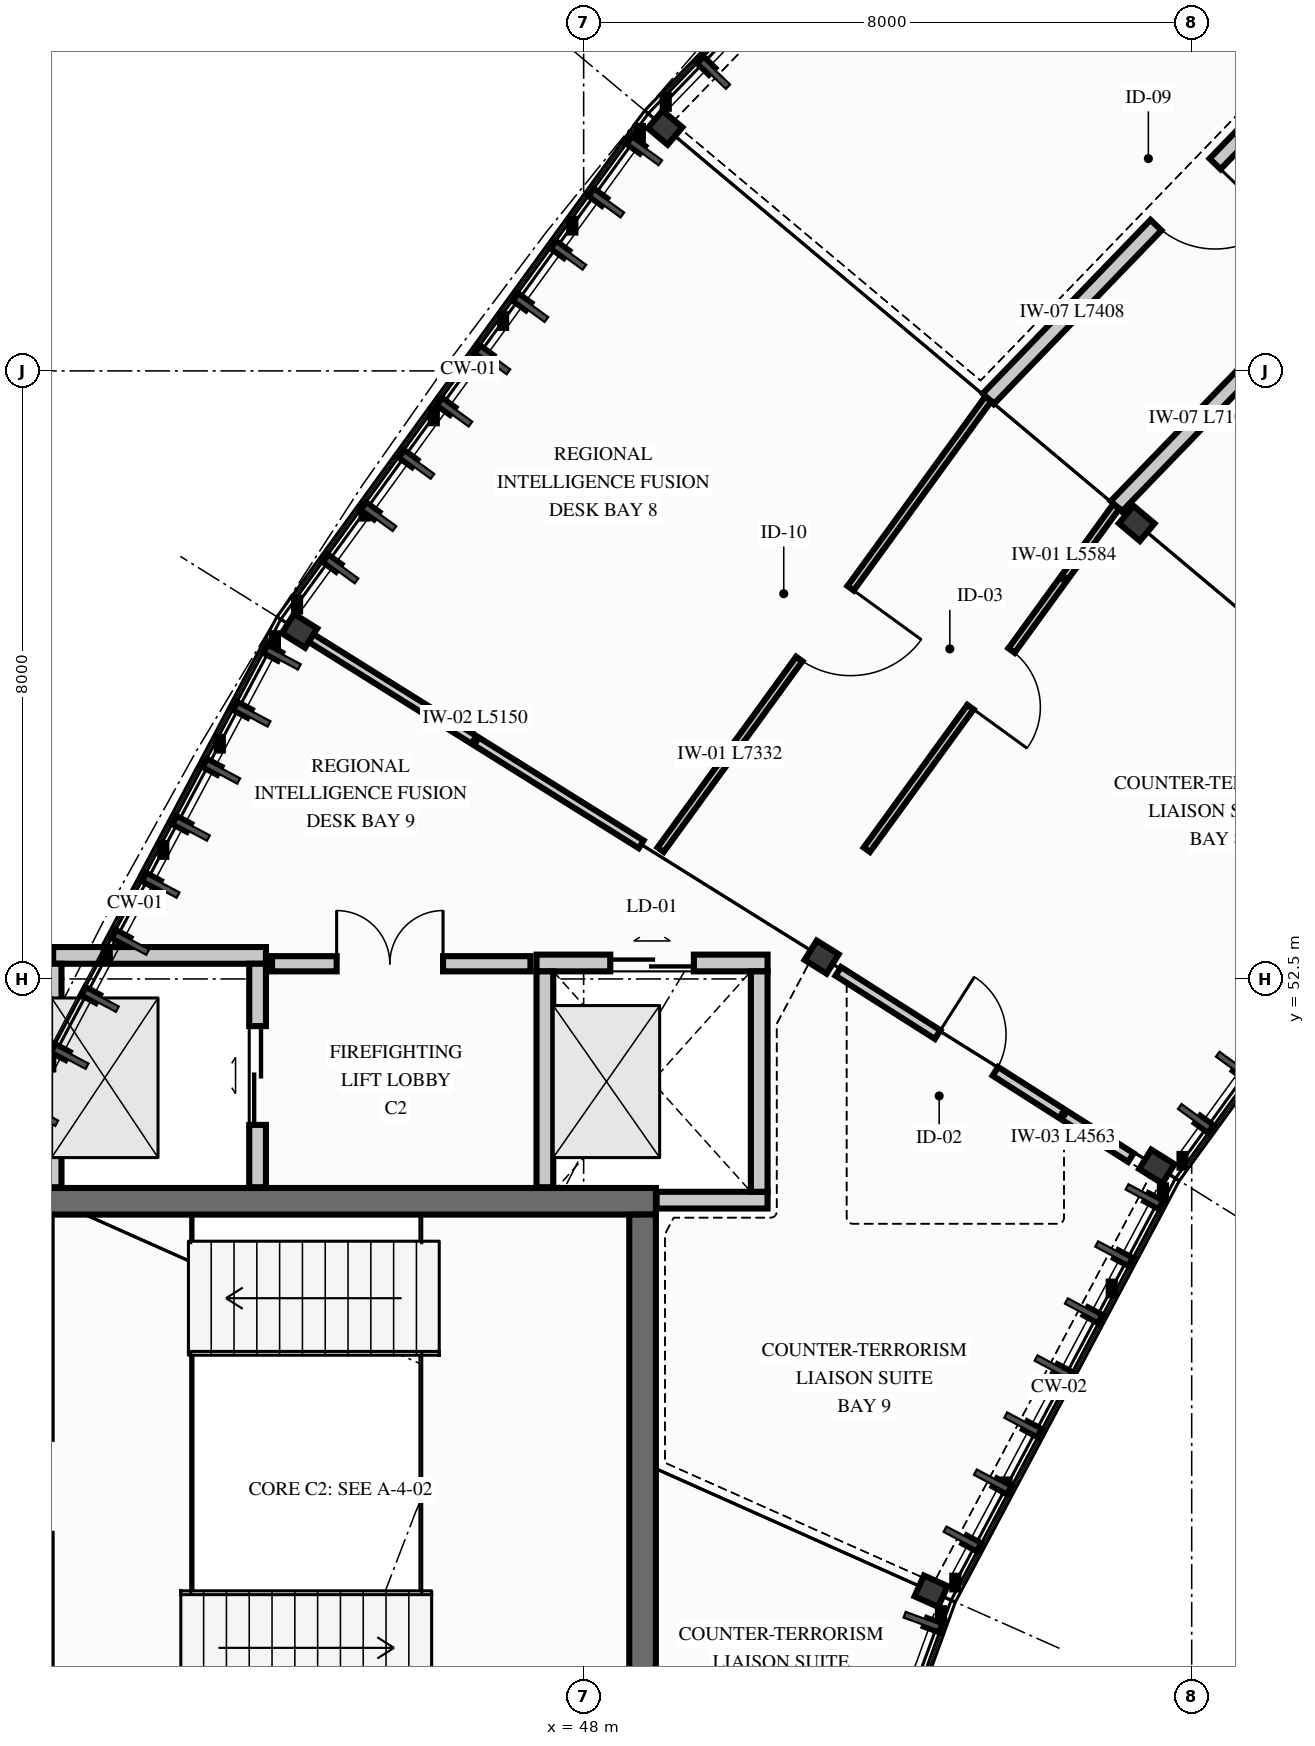
"""IFC4 building model, lengths in metres.
Left out: names, types, materials, properties, quantities, classifications, styles, units other than length and angle.
Written with IfcOpenShell. Run it as: python <this file> out.ifc"""

import sys

from ifc_helpers import new_model, si_unit, direction, frame, frame_2d, origin, origin_2d, place, context, subcontext, project, spatial, rectangle, i_section, extrude, element, fill, save


model = new_model("IFC4")
c1 = context("Model", 3, precision=1e-05, world=origin(), true_north=direction((0.0, 1.0)))
c2 = subcontext(c1, "Body", "Model", "MODEL_VIEW")
j1 = project(units=[si_unit("LENGTHUNIT", "METRE"), si_unit("PLANEANGLEUNIT", "RADIAN")], contexts=[c1])
p1 = place(None, origin())
s1 = spatial("IfcSite", under=j1, at=p1, CompositionType="ELEMENT")
p2 = place(p1, origin())
s2 = spatial("IfcBuilding", under=s1, at=p2, CompositionType="ELEMENT")
p3 = place(p2, frame((0.0, 0.0, 17.7)))
s3 = spatial("IfcBuildingStorey", under=s2, at=p3, CompositionType="ELEMENT", Elevation=17.7)
p4 = place(p3, frame((40.65, 49.575, 0.0), z_axis=(0.0, 0.0, 1.0), x_axis=(1.0, 0.0, 0.0)))
e1 = element("IfcWall", 1, at=p4, inside=s3, PredefinedType="SHEAR", context=c2, shape_type="SweptSolid", body=[
    extrude(rectangle(XDim=8.3, YDim=0.35, at=frame_2d((4.15, 0.0))), origin(), (0.0, 0.0, 1.0), 3.7),
])
p5 = place(p3, frame((48.775, 42.6, 0.0), z_axis=(0.0, 0.0, 1.0), x_axis=(0.0, 1.0, 0.0)))
e2 = element("IfcWall", 2, at=p5, inside=s3, PredefinedType="SHEAR", context=c2, shape_type="SweptSolid", body=[
    extrude(rectangle(XDim=6.8, YDim=0.35, at=frame_2d((3.4, 0.0))), origin(), (0.0, 0.0, 1.0), 3.7),
])
p6 = place(p3, frame((55.277, 58.493, 0.0), z_axis=(0.0, 0.0, 1.0), x_axis=(0.642787609687, 0.766044443119, 0.0)))
e3 = element("IfcColumn", 3, at=p6, inside=s3, PredefinedType="COLUMN", context=c2, shape_type="SweptSolid", body=[
    extrude(i_section(OverallWidth=0.3, OverallDepth=0.36, WebThickness=0.012, FlangeThickness=0.022, FilletRadius=0.027, at=origin_2d()), origin(), (0.0, 0.0, 1.0), 3.9),
])
p7 = place(p3, frame((49.072, 63.699, 0.0), z_axis=(0.0, 0.0, 1.0), x_axis=(0.642787609687, 0.766044443119, 0.0)))
e4 = element("IfcColumn", 4, at=p7, inside=s3, PredefinedType="COLUMN", context=c2, shape_type="SweptSolid", body=[
    extrude(i_section(OverallWidth=0.3, OverallDepth=0.34, WebThickness=0.012, FlangeThickness=0.021, FilletRadius=0.027, at=origin_2d()), origin(), (0.0, 0.0, 1.0), 3.9),
])
p8 = place(p3, frame((55.541, 50.032, 0.0), z_axis=(0.0, 0.0, 1.0), x_axis=(0.529919264233, 0.848048096156, 0.0)))
e5 = element("IfcColumn", 5, at=p8, inside=s3, PredefinedType="COLUMN", context=c2, shape_type="SweptSolid", body=[
    extrude(i_section(OverallWidth=0.3, OverallDepth=0.36, WebThickness=0.012, FlangeThickness=0.022, FilletRadius=0.027, at=origin_2d()), origin(), (0.0, 0.0, 1.0), 3.9),
])
p9 = place(p3, frame((51.131, 52.787, 0.0), z_axis=(0.0, 0.0, 1.0), x_axis=(0.529919264233, 0.848048096156, 0.0)))
e6 = element("IfcColumn", 6, at=p9, inside=s3, PredefinedType="COLUMN", context=c2, shape_type="SweptSolid", body=[
    extrude(i_section(OverallWidth=0.3, OverallDepth=0.34, WebThickness=0.012, FlangeThickness=0.021, FilletRadius=0.027, at=origin_2d()), origin(), (0.0, 0.0, 1.0), 3.9),
])
p10 = place(p3, frame((44.262, 57.08, 0.0), z_axis=(0.0, 0.0, 1.0), x_axis=(0.529919264233, 0.848048096156, 0.0)))
e7 = element("IfcColumn", 7, at=p10, inside=s3, PredefinedType="COLUMN", context=c2, shape_type="SweptSolid", body=[
    extrude(i_section(OverallWidth=0.3, OverallDepth=0.36, WebThickness=0.012, FlangeThickness=0.022, FilletRadius=0.027, at=origin_2d()), origin(), (0.0, 0.0, 1.0), 3.9),
])
p11 = place(p3, frame((52.571, 44.446, 0.0), z_axis=(0.0, 0.0, 1.0), x_axis=(0.406736643076, 0.913545457643, 0.0)))
e8 = element("IfcColumn", 8, at=p11, inside=s3, PredefinedType="COLUMN", context=c2, shape_type="SweptSolid", body=[
    extrude(i_section(OverallWidth=0.3, OverallDepth=0.34, WebThickness=0.012, FlangeThickness=0.021, FilletRadius=0.027, at=origin_2d()), origin(), (0.0, 0.0, 1.0), 3.9),
])
p12 = place(p3, frame((41.02, 52.81, 0.0), z_axis=(0.0, 0.0, 1.0), x_axis=(1.0, 0.0, 0.0)))
e9 = element("IfcWall", 9, at=p12, inside=s3, PredefinedType="PARTITIONING", context=c2, shape_type="SweptSolid", body=[
    extrude(rectangle(XDim=2.8, YDim=0.22, at=frame_2d((1.4, 0.0))), origin(), (0.0, 0.0, 1.0), 3.68),
])
p13 = place(p3, frame((41.02, 49.76, 0.0), z_axis=(0.0, 0.0, 1.0), x_axis=(0.0, 1.0, 0.0)))
e10 = element("IfcWall", 10, at=p13, inside=s3, PredefinedType="PARTITIONING", context=c2, shape_type="SweptSolid", body=[
    extrude(rectangle(XDim=2.94, YDim=0.22, at=frame_2d((1.47, 0.0))), origin(), (0.0, 0.0, 1.0), 3.68),
])
p14 = place(p3, frame((43.71, 49.76, 0.0), z_axis=(0.0, 0.0, 1.0), x_axis=(0.0, 1.0, 0.0)))
e11 = element("IfcWall", 11, at=p14, inside=s3, PredefinedType="PARTITIONING", context=c2, shape_type="SweptSolid", body=[
    extrude(rectangle(XDim=2.94, YDim=0.22, at=frame_2d((1.47, 0.0))), origin(), (0.0, 0.0, 1.0), 3.68),
])
p15 = place(p14, frame((0.82, 0.0, 0.0)))
e12 = element("IfcOpeningElement", 12, at=p15, cuts=e11, PredefinedType="OPENING", context=c2, shape_type="SweptSolid", body=[
    extrude(rectangle(XDim=1.3, YDim=2.2, at=frame_2d((0.65, 1.1))), frame((0.0, 0.12, 0.0), z_axis=(0.0, -1.0, 0.0), x_axis=(1.0, 0.0, 0.0)), (0.0, 0.0, 1.0), 0.24),
])
p16 = place(p3, frame((48.96, 49.59, 0.0), z_axis=(0.0, 0.0, 1.0), x_axis=(1.0, 0.0, 0.0)))
e13 = element("IfcWall", 13, at=p16, inside=s3, PredefinedType="PARTITIONING", context=c2, shape_type="SweptSolid", body=[
    extrude(rectangle(XDim=1.46, YDim=0.22, at=frame_2d((0.73, 0.0))), origin(), (0.0, 0.0, 1.0), 3.68),
])
p17 = place(p3, frame((47.38, 52.71, 0.0), z_axis=(0.0, 0.0, 1.0), x_axis=(1.0, 0.0, 0.0)))
e14 = element("IfcWall", 14, at=p17, inside=s3, PredefinedType="PARTITIONING", context=c2, shape_type="SweptSolid", body=[
    extrude(rectangle(XDim=3.04, YDim=0.22, at=frame_2d((1.52, 0.0))), origin(), (0.0, 0.0, 1.0), 3.68),
])
p18 = place(p17, frame((0.97, 0.0, 0.0)))
e15 = element("IfcOpeningElement", 15, at=p18, cuts=e14, PredefinedType="OPENING", context=c2, shape_type="SweptSolid", body=[
    extrude(rectangle(XDim=1.1, YDim=2.15, at=frame_2d((0.55, 1.075))), frame((0.0, 0.12, 0.0), z_axis=(0.0, -1.0, 0.0), x_axis=(1.0, 0.0, 0.0)), (0.0, 0.0, 1.0), 0.24),
])
p19 = place(p3, frame((47.49, 49.76, 0.0), z_axis=(0.0, 0.0, 1.0), x_axis=(0.0, 1.0, 0.0)))
e16 = element("IfcWall", 16, at=p19, inside=s3, PredefinedType="PARTITIONING", context=c2, shape_type="SweptSolid", body=[
    extrude(rectangle(XDim=2.84, YDim=0.22, at=frame_2d((1.42, 0.0))), origin(), (0.0, 0.0, 1.0), 3.68),
])
p20 = place(p3, frame((50.31, 49.7, 0.0), z_axis=(0.0, 0.0, 1.0), x_axis=(0.0, 1.0, 0.0)))
e17 = element("IfcWall", 17, at=p20, inside=s3, PredefinedType="PARTITIONING", context=c2, shape_type="SweptSolid", body=[
    extrude(rectangle(XDim=2.9, YDim=0.22, at=frame_2d((1.45, 0.0))), origin(), (0.0, 0.0, 1.0), 3.68),
])
p21 = place(p3, frame((43.9, 52.7, 0.0), z_axis=(0.0, 0.0, 1.0), x_axis=(1.0, 0.0, 0.0)))
e18 = element("IfcWall", 18, at=p21, inside=s3, PredefinedType="PARTITIONING", context=c2, shape_type="SweptSolid", body=[
    extrude(rectangle(XDim=3.4, YDim=0.2, at=frame_2d((1.7, 0.0))), origin(), (0.0, 0.0, 1.0), 3.68),
])
p22 = place(p21, frame((0.85, 0.0, 0.0)))
e19 = element("IfcOpeningElement", 19, at=p22, cuts=e18, PredefinedType="OPENING", context=c2, shape_type="SweptSolid", body=[
    extrude(rectangle(XDim=1.4, YDim=2.25, at=frame_2d((0.7, 1.125))), frame((0.0, 0.11, 0.0), z_axis=(0.0, -1.0, 0.0), x_axis=(1.0, 0.0, 0.0)), (0.0, 0.0, 1.0), 0.22),
])
p23 = place(p3, frame((51.35, 52.6, 0.0), z_axis=(0.0, 0.0, 1.0), x_axis=(0.84363284859, -0.536920493909, 0.0)))
e20 = element("IfcWall", 20, at=p23, inside=s3, PredefinedType="PARTITIONING", context=c2, shape_type="SweptSolid", body=[
    extrude(rectangle(XDim=4.563, YDim=0.135, at=frame_2d((2.282, 0.0))), origin(), (0.0, 0.0, 1.0), 3.3),
])
p24 = place(p23, frame((1.55, 0.0, 0.0)))
e21 = element("IfcOpeningElement", 21, at=p24, cuts=e20, PredefinedType="OPENING", context=c2, shape_type="SweptSolid", body=[
    extrude(rectangle(XDim=0.9, YDim=2.1, at=frame_2d((0.45, 1.05))), frame((0.0, 0.077, 0.0), z_axis=(0.0, -1.0, 0.0), x_axis=(1.0, 0.0, 0.0)), (0.0, 0.0, 1.0), 0.155),
])
p25 = place(p3, frame((59.941, 63.826, 0.0), z_axis=(0.0, 0.0, 1.0), x_axis=(-0.694674270111, -0.719324445884, 0.0)))
e22 = element("IfcWall", 22, at=p25, inside=s3, PredefinedType="PARTITIONING", context=c2, shape_type="SweptSolid", body=[
    extrude(rectangle(XDim=7.101, YDim=0.2, at=frame_2d((3.551, 0.0))), origin(), (0.0, 0.0, 1.0), 3.68),
])
p26 = place(p25, frame((2.983, 0.0, 0.0)))
e23 = element("IfcOpeningElement", 23, at=p26, cuts=e22, PredefinedType="OPENING", context=c2, shape_type="SweptSolid", body=[
    extrude(rectangle(XDim=0.9, YDim=2.1, at=frame_2d((0.45, 1.05))), frame((0.0, 0.11, 0.0), z_axis=(0.0, -1.0, 0.0), x_axis=(1.0, 0.0, 0.0)), (0.0, 0.0, 1.0), 0.22),
])
p27 = place(p3, frame((58.469, 65.461, 0.0), z_axis=(0.0, 0.0, 1.0), x_axis=(-0.694673907436, -0.71932479613, 0.0)))
e24 = element("IfcWall", 24, at=p27, inside=s3, PredefinedType="PARTITIONING", context=c2, shape_type="SweptSolid", body=[
    extrude(rectangle(XDim=7.408, YDim=0.2, at=frame_2d((3.704, 0.0))), origin(), (0.0, 0.0, 1.0), 3.68),
])
p28 = place(p27, frame((3.111, 0.0, 0.0)))
e25 = element("IfcOpeningElement", 25, at=p28, cuts=e24, PredefinedType="OPENING", context=c2, shape_type="SweptSolid", body=[
    extrude(rectangle(XDim=1.12, YDim=2.2, at=frame_2d((0.56, 1.1))), frame((0.0, 0.11, 0.0), z_axis=(0.0, -1.0, 0.0), x_axis=(1.0, 0.0, 0.0)), (0.0, 0.0, 1.0), 0.22),
])
p29 = place(p3, frame((55.008, 58.718, 0.0), z_axis=(0.0, 0.0, 1.0), x_axis=(-0.587773920785, -0.809025227076, 0.0)))
e26 = element("IfcWall", 26, at=p29, inside=s3, PredefinedType="PARTITIONING", context=c2, shape_type="SweptSolid", body=[
    extrude(rectangle(XDim=5.584, YDim=0.1, at=frame_2d((2.792, 0.0))), origin(), (0.0, 0.0, 1.0), 3.68),
])
p30 = place(p29, frame((2.345, 0.0, 0.0)))
e27 = element("IfcOpeningElement", 27, at=p30, cuts=e26, PredefinedType="OPENING", context=c2, shape_type="SweptSolid", body=[
    extrude(rectangle(XDim=0.92, YDim=2.12, at=frame_2d((0.46, 1.06))), frame((0.0, 0.06, 0.0), z_axis=(0.0, -1.0, 0.0), x_axis=(1.0, 0.0, 0.0)), (0.0, 0.0, 1.0), 0.12),
])
p31 = place(p3, frame((53.323, 60.132, 0.0), z_axis=(0.0, 0.0, 1.0), x_axis=(-0.587773694682, -0.809025391344, 0.0)))
e28 = element("IfcWall", 28, at=p31, inside=s3, PredefinedType="PARTITIONING", context=c2, shape_type="SweptSolid", body=[
    extrude(rectangle(XDim=7.333, YDim=0.1, at=frame_2d((3.666, 0.0))), origin(), (0.0, 0.0, 1.0), 3.68),
])
p32 = place(p31, frame((3.08, 0.0, 0.0)))
e29 = element("IfcOpeningElement", 29, at=p32, cuts=e28, PredefinedType="OPENING", context=c2, shape_type="SweptSolid", body=[
    extrude(rectangle(XDim=1.15, YDim=2.2, at=frame_2d((0.575, 1.1))), frame((0.0, 0.06, 0.0), z_axis=(0.0, -1.0, 0.0), x_axis=(1.0, 0.0, 0.0)), (0.0, 0.0, 1.0), 0.12),
])
p33 = place(p3, frame((48.757, 54.271, 0.0), z_axis=(0.0, 0.0, 1.0), x_axis=(-0.848054228257, 0.529909450694, 0.0)))
e30 = element("IfcWall", 30, at=p33, inside=s3, PredefinedType="PARTITIONING", context=c2, shape_type="SweptSolid", body=[
    extrude(rectangle(XDim=5.15, YDim=0.12, at=frame_2d((2.575, 0.0))), origin(), (0.0, 0.0, 1.0), 3.25),
])
p34 = place(p15, origin())
e31 = element("IfcDoor", 31, at=p34, inside=s3, OperationType="DOUBLE_DOOR_SLIDING", PredefinedType="DOOR", context=c2, shape_type="SweptSolid", body=[
    extrude(rectangle(XDim=1.3, YDim=2.2, at=frame_2d((0.65, 1.1))), frame((0.0, 0.025, 0.0), z_axis=(0.0, -1.0, 0.0), x_axis=(1.0, 0.0, 0.0)), (0.0, 0.0, 1.0), 0.05),
])
fill(e12, e31)
p35 = place(p18, origin())
e32 = element("IfcDoor", 32, at=p35, inside=s3, OperationType="DOUBLE_DOOR_SLIDING", PredefinedType="DOOR", context=c2, shape_type="SweptSolid", body=[
    extrude(rectangle(XDim=1.1, YDim=2.15, at=frame_2d((0.55, 1.075))), frame((0.0, 0.025, 0.0), z_axis=(0.0, -1.0, 0.0), x_axis=(1.0, 0.0, 0.0)), (0.0, 0.0, 1.0), 0.05),
])
fill(e15, e32)
p36 = place(p22, origin())
e33 = element("IfcDoor", 33, at=p36, inside=s3, OperationType="DOUBLE_DOOR_SINGLE_SWING", PredefinedType="DOOR", context=c2, shape_type="SweptSolid", body=[
    extrude(rectangle(XDim=1.4, YDim=2.25, at=frame_2d((0.7, 1.125))), frame((0.0, 0.025, 0.0), z_axis=(0.0, -1.0, 0.0), x_axis=(1.0, 0.0, 0.0)), (0.0, 0.0, 1.0), 0.05),
])
fill(e19, e33)
p37 = place(p24, origin())
e34 = element("IfcDoor", 34, at=p37, inside=s3, OperationType="SINGLE_SWING_LEFT", PredefinedType="DOOR", context=c2, shape_type="SweptSolid", body=[
    extrude(rectangle(XDim=0.9, YDim=2.1, at=frame_2d((0.45, 1.05))), frame((0.0, 0.025, 0.0), z_axis=(0.0, -1.0, 0.0), x_axis=(1.0, 0.0, 0.0)), (0.0, 0.0, 1.0), 0.05),
])
fill(e21, e34)
p38 = place(p28, origin())
e35 = element("IfcDoor", 35, at=p38, inside=s3, OperationType="SINGLE_SWING_LEFT", PredefinedType="DOOR", context=c2, shape_type="SweptSolid", body=[
    extrude(rectangle(XDim=1.12, YDim=2.2, at=frame_2d((0.56, 1.1))), frame((0.0, 0.025, 0.0), z_axis=(0.0, -1.0, 0.0), x_axis=(1.0, 0.0, 0.0)), (0.0, 0.0, 1.0), 0.05),
])
fill(e25, e35)
p39 = place(p30, origin())
e36 = element("IfcDoor", 36, at=p39, inside=s3, OperationType="SINGLE_SWING_RIGHT", PredefinedType="DOOR", context=c2, shape_type="SweptSolid", body=[
    extrude(rectangle(XDim=0.92, YDim=2.12, at=frame_2d((0.46, 1.06))), frame((0.0, 0.025, 0.0), z_axis=(0.0, -1.0, 0.0), x_axis=(1.0, 0.0, 0.0)), (0.0, 0.0, 1.0), 0.05),
])
fill(e27, e36)
p40 = place(p32, origin())
e37 = element("IfcDoor", 37, at=p40, inside=s3, OperationType="SINGLE_SWING_LEFT", PredefinedType="DOOR", context=c2, shape_type="SweptSolid", body=[
    extrude(rectangle(XDim=1.15, YDim=2.2, at=frame_2d((0.575, 1.1))), frame((0.0, 0.025, 0.0), z_axis=(0.0, -1.0, 0.0), x_axis=(1.0, 0.0, 0.0)), (0.0, 0.0, 1.0), 0.05),
])
fill(e29, e37)
save(model, sys.argv[1])
